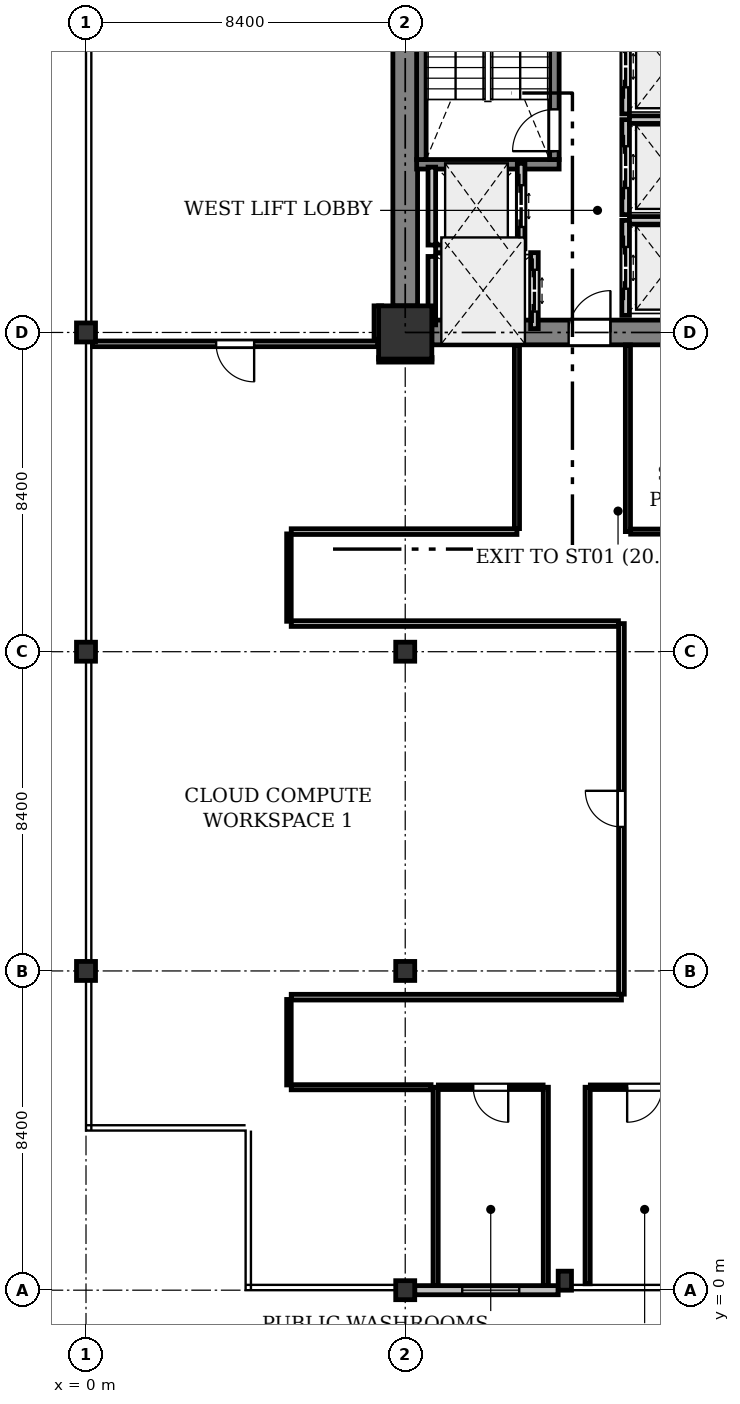
"""IFC4 building model, lengths in metres.
Left out: names, types, materials, properties, quantities, classifications, styles, units other than length and angle.
Written with IfcOpenShell. Run it as: python <this file> out.ifc"""

import sys

from ifc_helpers import new_model, si_unit, direction, frame, frame_2d, origin, origin_2d, place, context, subcontext, project, spatial, rectangle, i_section, extrude, element, fill, save


model = new_model("IFC4")
c1 = context("Model", 3, precision=1e-05, world=origin(), true_north=direction((0.0, 1.0)))
c2 = subcontext(c1, "Body", "Model", "MODEL_VIEW")
j1 = project(units=[si_unit("LENGTHUNIT", "METRE"), si_unit("PLANEANGLEUNIT", "RADIAN")], contexts=[c1])
p1 = place(None, origin())
s1 = spatial("IfcSite", under=j1, at=p1, CompositionType="ELEMENT")
p2 = place(p1, origin())
s2 = spatial("IfcBuilding", under=s1, at=p2, CompositionType="ELEMENT")
p3 = place(p2, frame((0.0, 0.0, 24.8)))
s3 = spatial("IfcBuildingStorey", under=s2, at=p3, CompositionType="ELEMENT", Elevation=24.8)
for number, where, z_axis, x_axis in (
    (1, (0.0, 8.4, 0.0), (0.0, 0.0, 1.0), (1.0, 0.0, 0.0)),
    (2, (0.0, 16.8, 0.0), (0.0, 0.0, 1.0), (1.0, 0.0, 0.0)),
    (3, (0.0, 25.2, 0.0), (0.0, 0.0, 1.0), (1.0, 0.0, 0.0)),
    (4, (8.4, 0.0, 0.0), (0.0, 0.0, 1.0), (1.0, 0.0, 0.0)),
    (5, (8.4, 8.4, 0.0), (0.0, 0.0, 1.0), (1.0, 0.0, 0.0)),
    (6, (8.4, 16.8, 0.0), (0.0, 0.0, 1.0), (1.0, 0.0, 0.0)),
):
    element("IfcColumn", number, at=place(p3, frame(where, z_axis=z_axis, x_axis=x_axis)), inside=s3, PredefinedType="COLUMN", context=c2, shape_type="SweptSolid", body=[
        extrude(i_section(OverallWidth=0.5, OverallDepth=0.5, WebThickness=0.028, FlangeThickness=0.04, at=origin_2d()), origin(), (0.0, 0.0, 1.0), 4.2),
    ])
p4 = place(p3, frame((8.4, 25.2, 0.0), z_axis=(0.0, 0.0, 1.0), x_axis=(1.0, 0.0, 0.0)))
e7 = element("IfcColumn", 7, at=p4, inside=s3, PredefinedType="COLUMN", context=c2, shape_type="SweptSolid", body=[
    extrude(rectangle(XDim=1.4, YDim=1.4, at=origin_2d()), origin(), (0.0, 0.0, 1.0), 4.2),
])
p5 = place(p3, frame((12.6, 0.25, 0.0), z_axis=(0.0, 0.0, 1.0), x_axis=(1.0, 0.0, 0.0)))
e8 = element("IfcColumn", 8, at=p5, inside=s3, PredefinedType="PILASTER", context=c2, shape_type="SweptSolid", body=[
    extrude(rectangle(XDim=0.35, YDim=0.5, at=origin_2d()), origin(), (0.0, 0.0, 1.0), 4.2),
])
p6 = place(p3, frame((12.425, 0.0, 0.0), z_axis=(0.0, 0.0, 1.0), x_axis=(-1.0, 0.0, 0.0)))
e9 = element("IfcWall", 9, at=p6, inside=s3, PredefinedType="STANDARD", context=c2, shape_type="SweptSolid", body=[
    extrude(rectangle(XDim=3.775, YDim=0.24, at=frame_2d((1.888, 0.0))), origin(), (0.0, 0.0, 1.0), 3.471),
])
p7 = place(p6, frame((1.137, 0.0, 0.9)))
e10 = element("IfcOpeningElement", 10, at=p7, cuts=e9, PredefinedType="OPENING", context=c2, shape_type="SweptSolid", body=[
    extrude(rectangle(XDim=1.5, YDim=1.6, at=frame_2d((0.75, 0.8))), frame((0.0, 0.13, 0.0), z_axis=(0.0, -1.0, 0.0), x_axis=(1.0, 0.0, 0.0)), (0.0, 0.0, 1.0), 0.26),
])
p8 = place(p3, frame((8.4, 25.9, 0.0), z_axis=(0.0, 0.0, 1.0), x_axis=(0.0, 1.0, 0.0)))
e11 = element("IfcWall", 11, at=p8, inside=s3, PredefinedType="SHEAR", context=c2, shape_type="SweptSolid", body=[
    extrude(rectangle(XDim=7.0, YDim=0.65, at=frame_2d((3.5, 0.0))), origin(), (0.0, 0.0, 1.0), 3.925),
])
p9 = place(p3, frame((9.1, 25.2, 0.0), z_axis=(0.0, 0.0, 1.0), x_axis=(1.0, 0.0, 0.0)))
e12 = element("IfcWall", 12, at=p9, inside=s3, PredefinedType="SHEAR", context=c2, shape_type="SweptSolid", body=[
    extrude(rectangle(XDim=7.0, YDim=0.65, at=frame_2d((3.5, 0.0))), origin(), (0.0, 0.0, 1.0), 3.925),
])
p10 = place(p9, frame((3.6, 0.0, 0.0)))
e13 = element("IfcOpeningElement", 13, at=p10, cuts=e12, PredefinedType="OPENING", context=c2, shape_type="SweptSolid", body=[
    extrude(rectangle(XDim=1.1, YDim=2.15, at=frame_2d((0.55, 1.075))), frame((0.0, 0.335, 0.0), z_axis=(0.0, -1.0, 0.0), x_axis=(1.0, 0.0, 0.0)), (0.0, 0.0, 1.0), 0.67),
])
p11 = place(p3, frame((12.45, 29.625, 0.0), z_axis=(0.0, 0.0, 1.0), x_axis=(-1.0, 0.0, 0.0)))
e14 = element("IfcWall", 14, at=p11, inside=s3, PredefinedType="SHEAR", context=c2, shape_type="SweptSolid", body=[
    extrude(rectangle(XDim=3.75, YDim=0.25, at=frame_2d((1.875, 0.0))), origin(), (0.0, 0.0, 1.0), 3.925),
])
p12 = place(p3, frame((12.325, 29.75, 0.0), z_axis=(0.0, 0.0, 1.0), x_axis=(0.0, 1.0, 0.0)))
e15 = element("IfcWall", 15, at=p12, inside=s3, PredefinedType="SHEAR", context=c2, shape_type="SweptSolid", body=[
    extrude(rectangle(XDim=7.75, YDim=0.25, at=frame_2d((3.875, 0.0))), origin(), (0.0, 0.0, 1.0), 3.925),
])
p13 = place(p12, frame((0.22, 0.0, 0.0)))
e16 = element("IfcOpeningElement", 16, at=p13, cuts=e15, PredefinedType="OPENING", context=c2, shape_type="SweptSolid", body=[
    extrude(rectangle(XDim=1.1, YDim=2.15, at=frame_2d((0.55, 1.075))), frame((0.0, 0.135, 0.0), z_axis=(0.0, -1.0, 0.0), x_axis=(1.0, 0.0, 0.0)), (0.0, 0.0, 1.0), 0.27),
])
p14 = place(p3, frame((8.825, 29.75, 0.0), z_axis=(0.0, 0.0, 1.0), x_axis=(0.0, 1.0, 0.0)))
e17 = element("IfcWall", 17, at=p14, inside=s3, PredefinedType="SHEAR", context=c2, shape_type="SweptSolid", body=[
    extrude(rectangle(XDim=7.75, YDim=0.25, at=frame_2d((3.875, 0.0))), origin(), (0.0, 0.0, 1.0), 3.925),
])
p15 = place(p3, frame((11.45, 27.4, 0.0), z_axis=(0.0, 0.0, 1.0), x_axis=(0.0, 1.0, 0.0)))
e18 = element("IfcWall", 18, at=p15, inside=s3, PredefinedType="PARTITIONING", context=c2, shape_type="SweptSolid", body=[
    extrude(rectangle(XDim=2.25, YDim=0.2, at=frame_2d((1.125, 0.0))), origin(), (0.0, 0.0, 1.0), 3.925),
])
p16 = place(p15, frame((0.575, 0.0, 0.0)))
e19 = element("IfcOpeningElement", 19, at=p16, cuts=e18, PredefinedType="OPENING", context=c2, shape_type="SweptSolid", body=[
    extrude(rectangle(XDim=1.1, YDim=2.2, at=frame_2d((0.55, 1.1))), frame((0.0, 0.11, 0.0), z_axis=(0.0, -1.0, 0.0), x_axis=(1.0, 0.0, 0.0)), (0.0, 0.0, 1.0), 0.22),
])
p17 = place(p3, frame((9.1, 27.5, 0.0), z_axis=(0.0, 0.0, 1.0), x_axis=(0.0, 1.0, 0.0)))
e20 = element("IfcWall", 20, at=p17, inside=s3, PredefinedType="PARTITIONING", context=c2, shape_type="SweptSolid", body=[
    extrude(rectangle(XDim=2.05, YDim=0.2, at=frame_2d((1.025, 0.0))), origin(), (0.0, 0.0, 1.0), 3.925),
])
p18 = place(p3, frame((9.2, 27.4, 0.0), z_axis=(0.0, 0.0, 1.0), x_axis=(1.0, 0.0, 0.0)))
e21 = element("IfcWall", 21, at=p18, inside=s3, PredefinedType="PARTITIONING", context=c2, shape_type="SweptSolid", body=[
    extrude(rectangle(XDim=2.15, YDim=0.2, at=frame_2d((1.075, 0.0))), origin(), (0.0, 0.0, 1.0), 3.925),
])
p19 = place(p3, frame((11.8, 25.3, 0.0), z_axis=(0.0, 0.0, 1.0), x_axis=(0.0, 1.0, 0.0)))
e22 = element("IfcWall", 22, at=p19, inside=s3, PredefinedType="PARTITIONING", context=c2, shape_type="SweptSolid", body=[
    extrude(rectangle(XDim=2.0, YDim=0.2, at=frame_2d((1.0, 0.0))), origin(), (0.0, 0.0, 1.0), 3.925),
])
p20 = place(p19, frame((0.45, 0.0, 0.0)))
e23 = element("IfcOpeningElement", 23, at=p20, cuts=e22, PredefinedType="OPENING", context=c2, shape_type="SweptSolid", body=[
    extrude(rectangle(XDim=1.1, YDim=2.2, at=frame_2d((0.55, 1.1))), frame((0.0, 0.11, 0.0), z_axis=(0.0, -1.0, 0.0), x_axis=(1.0, 0.0, 0.0)), (0.0, 0.0, 1.0), 0.22),
])
p21 = place(p3, frame((9.1, 25.4, 0.0), z_axis=(0.0, 0.0, 1.0), x_axis=(0.0, 1.0, 0.0)))
e24 = element("IfcWall", 24, at=p21, inside=s3, PredefinedType="PARTITIONING", context=c2, shape_type="SweptSolid", body=[
    extrude(rectangle(XDim=1.8, YDim=0.2, at=frame_2d((0.9, 0.0))), origin(), (0.0, 0.0, 1.0), 3.925),
])
p22 = place(p3, frame((14.2, 25.65, 0.0), z_axis=(0.0, 0.0, 1.0), x_axis=(0.0, 1.0, 0.0)))
e25 = element("IfcWall", 25, at=p22, inside=s3, PredefinedType="PARTITIONING", context=c2, shape_type="SweptSolid", body=[
    extrude(rectangle(XDim=2.5, YDim=0.2, at=frame_2d((1.25, 0.0))), origin(), (0.0, 0.0, 1.0), 3.925),
])
p23 = place(p22, frame((0.7, 0.0, 0.0)))
e26 = element("IfcOpeningElement", 26, at=p23, cuts=e25, PredefinedType="OPENING", context=c2, shape_type="SweptSolid", body=[
    extrude(rectangle(XDim=1.1, YDim=2.2, at=frame_2d((0.55, 1.1))), frame((0.0, 0.11, 0.0), z_axis=(0.0, -1.0, 0.0), x_axis=(1.0, 0.0, 0.0)), (0.0, 0.0, 1.0), 0.22),
])
p24 = place(p3, frame((14.3, 28.15, 0.0), z_axis=(0.0, 0.0, 1.0), x_axis=(1.0, 0.0, 0.0)))
e27 = element("IfcWall", 27, at=p24, inside=s3, PredefinedType="PARTITIONING", context=c2, shape_type="SweptSolid", body=[
    extrude(rectangle(XDim=2.05, YDim=0.2, at=frame_2d((1.025, 0.0))), origin(), (0.0, 0.0, 1.0), 3.925),
])
p25 = place(p3, frame((14.2, 28.3, 0.0), z_axis=(0.0, 0.0, 1.0), x_axis=(0.0, 1.0, 0.0)))
e28 = element("IfcWall", 28, at=p25, inside=s3, PredefinedType="PARTITIONING", context=c2, shape_type="SweptSolid", body=[
    extrude(rectangle(XDim=2.5, YDim=0.2, at=frame_2d((1.25, 0.0))), origin(), (0.0, 0.0, 1.0), 3.925),
])
p26 = place(p25, frame((0.7, 0.0, 0.0)))
e29 = element("IfcOpeningElement", 29, at=p26, cuts=e28, PredefinedType="OPENING", context=c2, shape_type="SweptSolid", body=[
    extrude(rectangle(XDim=1.1, YDim=2.2, at=frame_2d((0.55, 1.1))), frame((0.0, 0.11, 0.0), z_axis=(0.0, -1.0, 0.0), x_axis=(1.0, 0.0, 0.0)), (0.0, 0.0, 1.0), 0.22),
])
p27 = place(p3, frame((14.3, 30.8, 0.0), z_axis=(0.0, 0.0, 1.0), x_axis=(1.0, 0.0, 0.0)))
e30 = element("IfcWall", 30, at=p27, inside=s3, PredefinedType="PARTITIONING", context=c2, shape_type="SweptSolid", body=[
    extrude(rectangle(XDim=2.05, YDim=0.2, at=frame_2d((1.025, 0.0))), origin(), (0.0, 0.0, 1.0), 3.925),
])
p28 = place(p3, frame((14.2, 30.95, 0.0), z_axis=(0.0, 0.0, 1.0), x_axis=(0.0, 1.0, 0.0)))
e31 = element("IfcWall", 31, at=p28, inside=s3, PredefinedType="PARTITIONING", context=c2, shape_type="SweptSolid", body=[
    extrude(rectangle(XDim=2.5, YDim=0.2, at=frame_2d((1.25, 0.0))), origin(), (0.0, 0.0, 1.0), 3.925),
])
p29 = place(p28, frame((0.7, 0.0, 0.0)))
e32 = element("IfcOpeningElement", 32, at=p29, cuts=e31, PredefinedType="OPENING", context=c2, shape_type="SweptSolid", body=[
    extrude(rectangle(XDim=1.1, YDim=2.2, at=frame_2d((0.55, 1.1))), frame((0.0, 0.11, 0.0), z_axis=(0.0, -1.0, 0.0), x_axis=(1.0, 0.0, 0.0)), (0.0, 0.0, 1.0), 0.22),
])
p30 = place(p3, frame((13.2, 5.34, 0.0), z_axis=(0.0, 0.0, 1.0), x_axis=(0.0, -1.0, 0.0)))
e33 = element("IfcWall", 33, at=p30, inside=s3, PredefinedType="PARTITIONING", context=c2, shape_type="SweptSolid", body=[
    extrude(rectangle(XDim=5.171, YDim=0.135, at=frame_2d((2.585, 0.0))), origin(), (0.0, 0.0, 1.0), 3.925),
])
p31 = place(p3, frame((16.128, 5.34, 0.0), z_axis=(0.0, 0.0, 1.0), x_axis=(-1.0, 0.0, 0.0)))
e34 = element("IfcWall", 34, at=p31, inside=s3, PredefinedType="PARTITIONING", context=c2, shape_type="SweptSolid", body=[
    extrude(rectangle(XDim=2.857, YDim=0.12, at=frame_2d((1.428, 0.0))), origin(), (0.0, 0.0, 1.0), 3.925),
])
p32 = place(p31, frame((0.969, 0.0, 0.0)))
e35 = element("IfcOpeningElement", 35, at=p32, cuts=e34, PredefinedType="OPENING", context=c2, shape_type="SweptSolid", body=[
    extrude(rectangle(XDim=0.92, YDim=2.1, at=frame_2d((0.46, 1.05))), frame((0.0, 0.07, 0.0), z_axis=(0.0, -1.0, 0.0), x_axis=(1.0, 0.0, 0.0)), (0.0, 0.0, 1.0), 0.14),
])
p33 = place(p3, frame((14.26, 24.871, 0.0), z_axis=(0.0, 0.0, 1.0), x_axis=(0.0, -1.0, 0.0)))
e36 = element("IfcWall", 36, at=p33, inside=s3, PredefinedType="PARTITIONING", context=c2, shape_type="SweptSolid", body=[
    extrude(rectangle(XDim=4.911, YDim=0.135, at=frame_2d((2.456, 0.0))), origin(), (0.0, 0.0, 1.0), 3.925),
])
p34 = place(p3, frame((14.332, 19.96, 0.0), z_axis=(0.0, 0.0, 1.0), x_axis=(1.0, 0.0, 0.0)))
e37 = element("IfcWall", 37, at=p34, inside=s3, PredefinedType="PARTITIONING", context=c2, shape_type="SweptSolid", body=[
    extrude(rectangle(XDim=3.208, YDim=0.135, at=frame_2d((1.604, 0.0))), origin(), (0.0, 0.0, 1.0), 3.323),
])
p35 = place(p3, frame((0.169, 31.693, 0.0), z_axis=(0.0, 0.0, 1.0), x_axis=(1.0, 0.0, 0.0)))
e38 = element("IfcWall", 38, at=p35, inside=s3, PredefinedType="PARTITIONING", context=c2, shape_type="SweptSolid", body=[
    extrude(rectangle(XDim=7.902, YDim=0.15, at=frame_2d((3.951, 0.0))), origin(), (0.0, 0.0, 1.0), 3.566),
])
p36 = place(p3, frame((9.106, 24.481, 0.0), z_axis=(0.0, 0.0, 1.0), x_axis=(-0.999999758706, -0.000694685487, 0.0)))
e39 = element("IfcWall", 39, at=p36, inside=s3, PredefinedType="PARTITIONING", context=c2, shape_type="SweptSolid", body=[
    extrude(rectangle(XDim=1.406, YDim=0.12, at=frame_2d((0.703, 0.0))), origin(), (0.0, 0.0, 1.0), 3.323),
])
p37 = place(p3, frame((7.681, 24.494, 0.0), z_axis=(0.0, 0.0, 1.0), x_axis=(0.0, 1.0, 0.0)))
e40 = element("IfcWall", 40, at=p37, inside=s3, PredefinedType="PARTITIONING", context=c2, shape_type="SweptSolid", body=[
    extrude(rectangle(XDim=1.412, YDim=0.12, at=frame_2d((0.706, 0.0))), origin(), (0.0, 0.0, 1.0), 3.313),
])
p38 = place(p3, frame((14.09, 5.46, 0.0), z_axis=(0.0, 0.0, 1.0), x_axis=(0.0, 1.0, 0.0)))
e41 = element("IfcWall", 41, at=p38, inside=s3, PredefinedType="PARTITIONING", context=c2, shape_type="SweptSolid", body=[
    extrude(rectangle(XDim=12.08, YDim=0.15, at=frame_2d((6.04, 0.0))), origin(), (0.0, 0.0, 1.0), 3.313),
])
p39 = place(p38, frame((5.565, 0.0, 0.0)))
e42 = element("IfcOpeningElement", 42, at=p39, cuts=e41, PredefinedType="OPENING", context=c2, shape_type="SweptSolid", body=[
    extrude(rectangle(XDim=0.95, YDim=2.15, at=frame_2d((0.475, 1.075))), frame((0.0, 0.085, 0.0), z_axis=(0.0, -1.0, 0.0), x_axis=(1.0, 0.0, 0.0)), (0.0, 0.0, 1.0), 0.17),
])
p40 = place(p3, frame((14.011, 17.54, 0.0), z_axis=(0.0, 0.0, 1.0), x_axis=(-1.0, 0.0, 0.0)))
e43 = element("IfcWall", 43, at=p40, inside=s3, PredefinedType="PARTITIONING", context=c2, shape_type="SweptSolid", body=[
    extrude(rectangle(XDim=8.611, YDim=0.15, at=frame_2d((4.306, 0.0))), origin(), (0.0, 0.0, 1.0), 3.323),
])
p41 = place(p3, frame((5.34, 17.6, 0.0), z_axis=(0.0, 0.0, 1.0), x_axis=(0.0, 1.0, 0.0)))
e44 = element("IfcWall", 44, at=p41, inside=s3, PredefinedType="PARTITIONING", context=c2, shape_type="SweptSolid", body=[
    extrude(rectangle(XDim=2.3, YDim=0.12, at=frame_2d((1.15, 0.0))), origin(), (0.0, 0.0, 1.0), 3.925),
])
p42 = place(p3, frame((5.4, 19.96, 0.0), z_axis=(0.0, 0.0, 1.0), x_axis=(1.0, 0.0, 0.0)))
e45 = element("IfcWall", 45, at=p42, inside=s3, PredefinedType="PARTITIONING", context=c2, shape_type="SweptSolid", body=[
    extrude(rectangle(XDim=5.94, YDim=0.15, at=frame_2d((2.97, 0.0))), origin(), (0.0, 0.0, 1.0), 3.323),
])
p43 = place(p3, frame((11.34, 20.039, 0.0), z_axis=(0.0, 0.0, 1.0), x_axis=(0.0, 1.0, 0.0)))
e46 = element("IfcWall", 46, at=p43, inside=s3, PredefinedType="PARTITIONING", context=c2, shape_type="SweptSolid", body=[
    extrude(rectangle(XDim=4.832, YDim=0.135, at=frame_2d((2.416, 0.0))), origin(), (0.0, 0.0, 1.0), 3.925),
])
p44 = place(p7, origin())
e47 = element("IfcWindow", 47, at=p44, inside=s3, PartitioningType="SINGLE_PANEL", PredefinedType="WINDOW", context=c2, shape_type="SweptSolid", body=[
    extrude(rectangle(XDim=1.5, YDim=1.6, at=frame_2d((0.75, 0.8))), frame((0.0, 0.03, 0.0), z_axis=(0.0, -1.0, 0.0), x_axis=(1.0, 0.0, 0.0)), (0.0, 0.0, 1.0), 0.06),
])
fill(e10, e47)
p45 = place(p10, origin())
e48 = element("IfcDoor", 48, at=p45, inside=s3, OperationType="SINGLE_SWING_LEFT", PredefinedType="DOOR", context=c2, shape_type="SweptSolid", body=[
    extrude(rectangle(XDim=1.1, YDim=2.15, at=frame_2d((0.55, 1.075))), frame((0.0, 0.025, 0.0), z_axis=(0.0, -1.0, 0.0), x_axis=(1.0, 0.0, 0.0)), (0.0, 0.0, 1.0), 0.05),
])
fill(e13, e48)
p46 = place(p13, origin())
e49 = element("IfcDoor", 49, at=p46, inside=s3, OperationType="SINGLE_SWING_RIGHT", PredefinedType="DOOR", context=c2, shape_type="SweptSolid", body=[
    extrude(rectangle(XDim=1.1, YDim=2.15, at=frame_2d((0.55, 1.075))), frame((0.0, 0.025, 0.0), z_axis=(0.0, -1.0, 0.0), x_axis=(1.0, 0.0, 0.0)), (0.0, 0.0, 1.0), 0.05),
])
fill(e16, e49)
p47 = place(p16, origin())
e50 = element("IfcDoor", 50, at=p47, inside=s3, OperationType="DOUBLE_DOOR_SLIDING", PredefinedType="DOOR", context=c2, shape_type="SweptSolid", body=[
    extrude(rectangle(XDim=1.1, YDim=2.2, at=frame_2d((0.55, 1.1))), frame((0.0, 0.025, 0.0), z_axis=(0.0, -1.0, 0.0), x_axis=(1.0, 0.0, 0.0)), (0.0, 0.0, 1.0), 0.05),
])
fill(e19, e50)
p48 = place(p20, origin())
e51 = element("IfcDoor", 51, at=p48, inside=s3, OperationType="DOUBLE_DOOR_SLIDING", PredefinedType="DOOR", context=c2, shape_type="SweptSolid", body=[
    extrude(rectangle(XDim=1.1, YDim=2.2, at=frame_2d((0.55, 1.1))), frame((0.0, 0.025, 0.0), z_axis=(0.0, -1.0, 0.0), x_axis=(1.0, 0.0, 0.0)), (0.0, 0.0, 1.0), 0.05),
])
fill(e23, e51)
p49 = place(p23, origin())
e52 = element("IfcDoor", 52, at=p49, inside=s3, OperationType="DOUBLE_DOOR_SLIDING", PredefinedType="DOOR", context=c2, shape_type="SweptSolid", body=[
    extrude(rectangle(XDim=1.1, YDim=2.2, at=frame_2d((0.55, 1.1))), frame((0.0, 0.025, 0.0), z_axis=(0.0, -1.0, 0.0), x_axis=(1.0, 0.0, 0.0)), (0.0, 0.0, 1.0), 0.05),
])
fill(e26, e52)
p50 = place(p26, origin())
e53 = element("IfcDoor", 53, at=p50, inside=s3, OperationType="DOUBLE_DOOR_SLIDING", PredefinedType="DOOR", context=c2, shape_type="SweptSolid", body=[
    extrude(rectangle(XDim=1.1, YDim=2.2, at=frame_2d((0.55, 1.1))), frame((0.0, 0.025, 0.0), z_axis=(0.0, -1.0, 0.0), x_axis=(1.0, 0.0, 0.0)), (0.0, 0.0, 1.0), 0.05),
])
fill(e29, e53)
p51 = place(p29, origin())
e54 = element("IfcDoor", 54, at=p51, inside=s3, OperationType="DOUBLE_DOOR_SLIDING", PredefinedType="DOOR", context=c2, shape_type="SweptSolid", body=[
    extrude(rectangle(XDim=1.1, YDim=2.2, at=frame_2d((0.55, 1.1))), frame((0.0, 0.025, 0.0), z_axis=(0.0, -1.0, 0.0), x_axis=(1.0, 0.0, 0.0)), (0.0, 0.0, 1.0), 0.05),
])
fill(e32, e54)
p52 = place(p32, origin())
e55 = element("IfcDoor", 55, at=p52, inside=s3, OperationType="SINGLE_SWING_RIGHT", PredefinedType="DOOR", context=c2, shape_type="SweptSolid", body=[
    extrude(rectangle(XDim=0.92, YDim=2.1, at=frame_2d((0.46, 1.05))), frame((0.0, 0.025, 0.0), z_axis=(0.0, -1.0, 0.0), x_axis=(1.0, 0.0, 0.0)), (0.0, 0.0, 1.0), 0.05),
])
fill(e35, e55)
p53 = place(p39, origin())
e56 = element("IfcDoor", 56, at=p53, inside=s3, OperationType="SINGLE_SWING_RIGHT", PredefinedType="DOOR", context=c2, shape_type="SweptSolid", body=[
    extrude(rectangle(XDim=0.95, YDim=2.15, at=frame_2d((0.475, 1.075))), frame((0.0, 0.025, 0.0), z_axis=(0.0, -1.0, 0.0), x_axis=(1.0, 0.0, 0.0)), (0.0, 0.0, 1.0), 0.05),
])
fill(e42, e56)
save(model, sys.argv[1])
